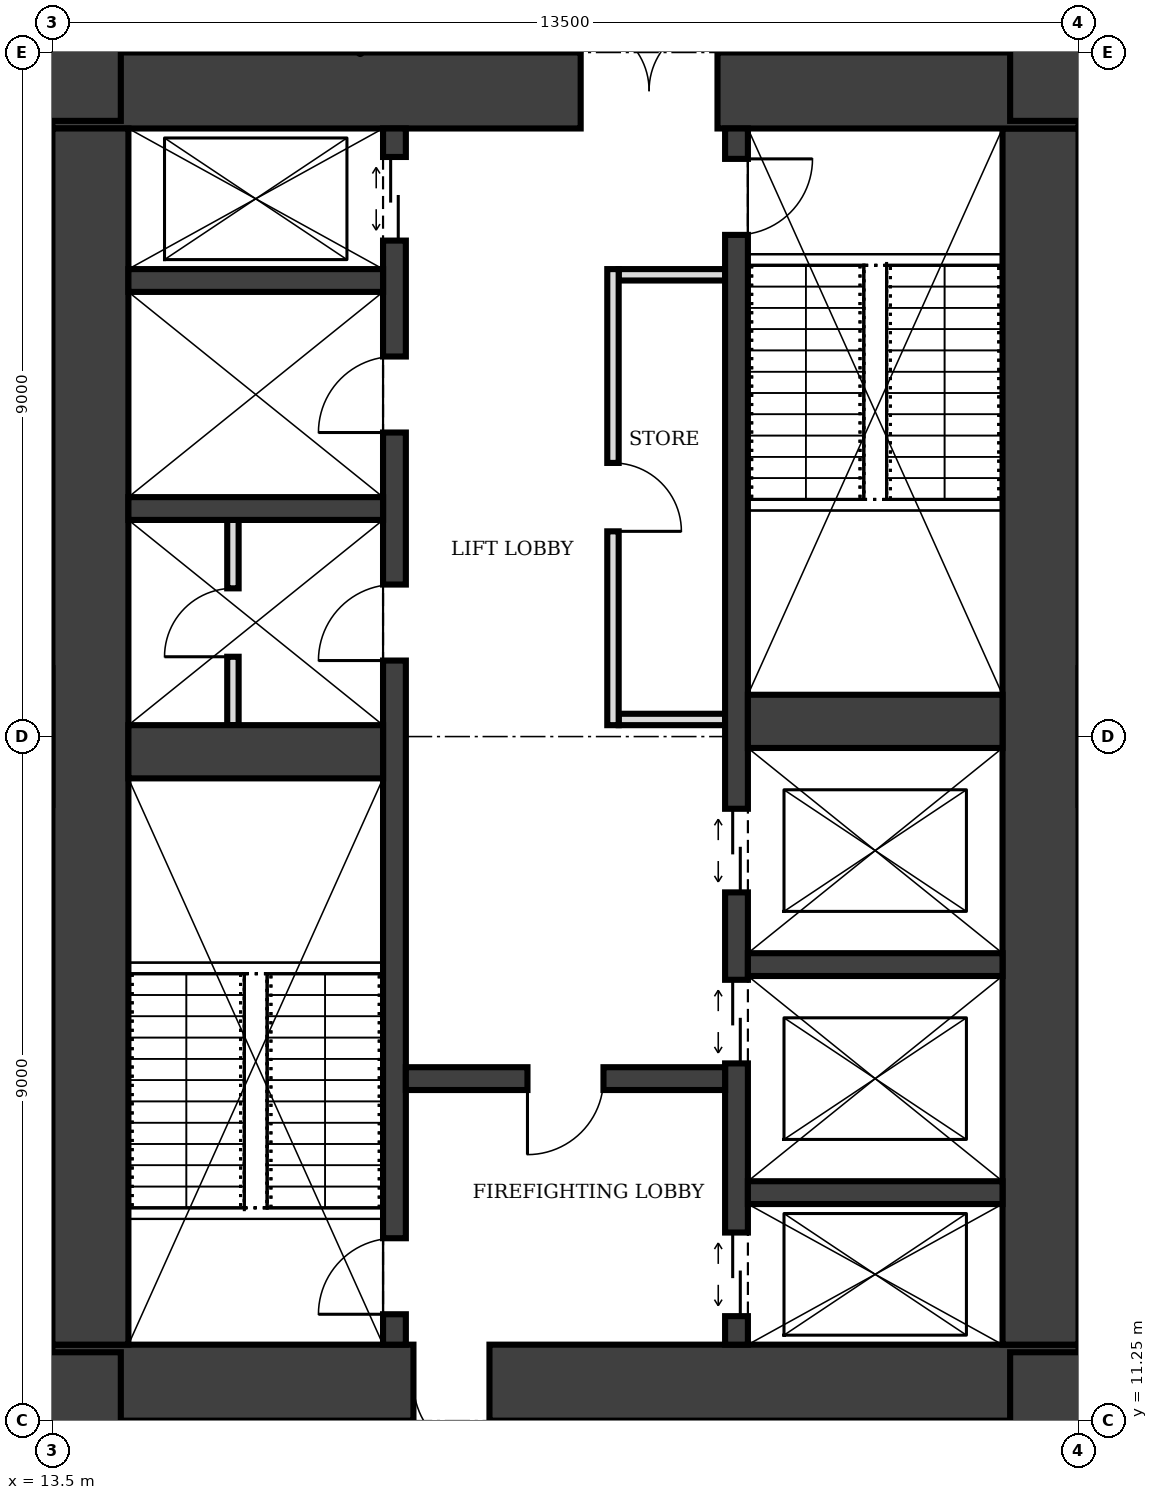
"""IFC4 building model, lengths in metres.
Left out: names, types, materials, properties, quantities, classifications, styles, units other than length and angle.
Written with IfcOpenShell. Run it as: python <this file> out.ifc"""

import sys

from ifc_helpers import new_model, si_unit, direction, frame, frame_2d, origin, place, context, subcontext, project, spatial, rectangle, extrude, element, fill, save


model = new_model("IFC4")
c1 = context("Model", 3, precision=1e-05, world=origin(), true_north=direction((0.0, 1.0)))
c2 = subcontext(c1, "Body", "Model", "MODEL_VIEW")
j1 = project(units=[si_unit("LENGTHUNIT", "METRE"), si_unit("PLANEANGLEUNIT", "RADIAN")], contexts=[c1])
p1 = place(None, origin())
s1 = spatial("IfcSite", under=j1, at=p1, CompositionType="ELEMENT")
p2 = place(p1, origin())
s2 = spatial("IfcBuilding", under=s1, at=p2, CompositionType="ELEMENT")
p3 = place(p2, frame((0.0, 0.0, 245.0)))
s3 = spatial("IfcBuildingStorey", under=s2, at=p3, CompositionType="ELEMENT", Elevation=245.0)
p4 = place(p3, frame((13.5, 11.75, 0.0), z_axis=(0.0, 0.0, 1.0), x_axis=(1.0, 0.0, 0.0)))
e1 = element("IfcWall", 1, at=p4, inside=s3, PredefinedType="SHEAR", context=c2, shape_type="SweptSolid", body=[
    extrude(rectangle(XDim=13.5, YDim=1.0, at=frame_2d((6.75, 0.0))), origin(), (0.0, 0.0, 1.0), 8.0),
])
p5 = place(p4, frame((4.75, 0.0, 0.0)))
e2 = element("IfcOpeningElement", 2, at=p5, cuts=e1, PredefinedType="OPENING", context=c2, shape_type="SweptSolid", body=[
    extrude(rectangle(XDim=1.0, YDim=2.1, at=frame_2d((0.5, 1.05))), frame((0.0, 0.51, 0.0), z_axis=(0.0, -1.0, 0.0), x_axis=(1.0, 0.0, 0.0)), (0.0, 0.0, 1.0), 1.02),
])
p6 = place(p3, frame((26.5, 12.25, 0.0), z_axis=(0.0, 0.0, 1.0), x_axis=(0.0, 1.0, 0.0)))
e3 = element("IfcWall", 3, at=p6, inside=s3, PredefinedType="SHEAR", context=c2, shape_type="SweptSolid", body=[
    extrude(rectangle(XDim=16.0, YDim=1.0, at=frame_2d((8.0, 0.0))), origin(), (0.0, 0.0, 1.0), 8.0),
])
p7 = place(p3, frame((27.0, 28.75, 0.0), z_axis=(0.0, 0.0, 1.0), x_axis=(-1.0, 0.0, 0.0)))
e4 = element("IfcWall", 4, at=p7, inside=s3, PredefinedType="SHEAR", context=c2, shape_type="SweptSolid", body=[
    extrude(rectangle(XDim=13.5, YDim=1.0, at=frame_2d((6.75, 0.0))), origin(), (0.0, 0.0, 1.0), 8.0),
])
p8 = place(p7, frame((4.75, 0.0, 0.0)))
e5 = element("IfcOpeningElement", 5, at=p8, cuts=e4, PredefinedType="OPENING", context=c2, shape_type="SweptSolid", body=[
    extrude(rectangle(XDim=1.8, YDim=2.1, at=frame_2d((0.9, 1.05))), frame((0.0, 0.51, 0.0), z_axis=(0.0, -1.0, 0.0), x_axis=(1.0, 0.0, 0.0)), (0.0, 0.0, 1.0), 1.02),
])
p9 = place(p3, frame((14.0, 28.25, 0.0), z_axis=(0.0, 0.0, 1.0), x_axis=(0.0, -1.0, 0.0)))
e6 = element("IfcWall", 6, at=p9, inside=s3, PredefinedType="SHEAR", context=c2, shape_type="SweptSolid", body=[
    extrude(rectangle(XDim=16.0, YDim=1.0, at=frame_2d((8.0, 0.0))), origin(), (0.0, 0.0, 1.0), 8.0),
])
p10 = place(p3, frame((18.0, 12.25, 0.0), z_axis=(0.0, 0.0, 1.0), x_axis=(0.0, 1.0, 0.0)))
e7 = element("IfcWall", 7, at=p10, inside=s3, PredefinedType="SHEAR", context=c2, shape_type="SweptSolid", body=[
    extrude(rectangle(XDim=16.0, YDim=0.3, at=frame_2d((8.0, 0.0))), origin(), (0.0, 0.0, 1.0), 8.0),
])
p11 = place(p10, frame((0.4, 0.0, 0.0)))
e8 = element("IfcOpeningElement", 8, at=p11, cuts=e7, PredefinedType="OPENING", context=c2, shape_type="SweptSolid", body=[
    extrude(rectangle(XDim=1.0, YDim=2.1, at=frame_2d((0.5, 1.05))), frame((0.0, 0.16, 0.0), z_axis=(0.0, -1.0, 0.0), x_axis=(1.0, 0.0, 0.0)), (0.0, 0.0, 1.0), 0.32),
])
p12 = place(p10, frame((14.525, 0.0, 0.0)))
e9 = element("IfcOpeningElement", 9, at=p12, cuts=e7, PredefinedType="OPENING", context=c2, shape_type="SweptSolid", body=[
    extrude(rectangle(XDim=1.1, YDim=2.1, at=frame_2d((0.55, 1.05))), frame((0.0, 0.16, 0.0), z_axis=(0.0, -1.0, 0.0), x_axis=(1.0, 0.0, 0.0)), (0.0, 0.0, 1.0), 0.32),
])
p13 = place(p10, frame((9.0, 0.0, 0.0)))
e10 = element("IfcOpeningElement", 10, at=p13, cuts=e7, PredefinedType="OPENING", context=c2, shape_type="SweptSolid", body=[
    extrude(rectangle(XDim=1.0, YDim=2.1, at=frame_2d((0.5, 1.05))), frame((0.0, 0.16, 0.0), z_axis=(0.0, -1.0, 0.0), x_axis=(1.0, 0.0, 0.0)), (0.0, 0.0, 1.0), 0.32),
])
p14 = place(p10, frame((12.0, 0.0, 0.0)))
e11 = element("IfcOpeningElement", 11, at=p14, cuts=e7, PredefinedType="OPENING", context=c2, shape_type="SweptSolid", body=[
    extrude(rectangle(XDim=1.0, YDim=2.1, at=frame_2d((0.5, 1.05))), frame((0.0, 0.16, 0.0), z_axis=(0.0, -1.0, 0.0), x_axis=(1.0, 0.0, 0.0)), (0.0, 0.0, 1.0), 0.32),
])
p15 = place(p3, frame((22.5, 12.25, 0.0), z_axis=(0.0, 0.0, 1.0), x_axis=(0.0, 1.0, 0.0)))
e12 = element("IfcWall", 12, at=p15, inside=s3, PredefinedType="SHEAR", context=c2, shape_type="SweptSolid", body=[
    extrude(rectangle(XDim=16.0, YDim=0.3, at=frame_2d((8.0, 0.0))), origin(), (0.0, 0.0, 1.0), 8.0),
])
p16 = place(p15, frame((14.6, 0.0, 0.0)))
e13 = element("IfcOpeningElement", 13, at=p16, cuts=e12, PredefinedType="OPENING", context=c2, shape_type="SweptSolid", body=[
    extrude(rectangle(XDim=1.0, YDim=2.1, at=frame_2d((0.5, 1.05))), frame((0.0, 0.16, 0.0), z_axis=(0.0, -1.0, 0.0), x_axis=(1.0, 0.0, 0.0)), (0.0, 0.0, 1.0), 0.32),
])
p17 = place(p15, frame((0.375, 0.0, 0.0)))
e14 = element("IfcOpeningElement", 14, at=p17, cuts=e12, PredefinedType="OPENING", context=c2, shape_type="SweptSolid", body=[
    extrude(rectangle(XDim=1.1, YDim=2.1, at=frame_2d((0.55, 1.05))), frame((0.0, 0.16, 0.0), z_axis=(0.0, -1.0, 0.0), x_axis=(1.0, 0.0, 0.0)), (0.0, 0.0, 1.0), 0.32),
])
p18 = place(p15, frame((3.7, 0.0, 0.0)))
e15 = element("IfcOpeningElement", 15, at=p18, cuts=e12, PredefinedType="OPENING", context=c2, shape_type="SweptSolid", body=[
    extrude(rectangle(XDim=1.1, YDim=2.1, at=frame_2d((0.55, 1.05))), frame((0.0, 0.16, 0.0), z_axis=(0.0, -1.0, 0.0), x_axis=(1.0, 0.0, 0.0)), (0.0, 0.0, 1.0), 0.32),
])
p19 = place(p15, frame((5.95, 0.0, 0.0)))
e16 = element("IfcOpeningElement", 16, at=p19, cuts=e12, PredefinedType="OPENING", context=c2, shape_type="SweptSolid", body=[
    extrude(rectangle(XDim=1.1, YDim=2.1, at=frame_2d((0.55, 1.05))), frame((0.0, 0.16, 0.0), z_axis=(0.0, -1.0, 0.0), x_axis=(1.0, 0.0, 0.0)), (0.0, 0.0, 1.0), 0.32),
])
p20 = place(p3, frame((14.5, 20.05, 0.0), z_axis=(0.0, 0.0, 1.0), x_axis=(1.0, 0.0, 0.0)))
e17 = element("IfcWall", 17, at=p20, inside=s3, PredefinedType="SHEAR", context=c2, shape_type="SweptSolid", body=[
    extrude(rectangle(XDim=3.35, YDim=0.7, at=frame_2d((1.675, 0.0))), origin(), (0.0, 0.0, 1.0), 8.0),
])
p21 = place(p3, frame((18.15, 15.75, 0.0), z_axis=(0.0, 0.0, 1.0), x_axis=(1.0, 0.0, 0.0)))
e18 = element("IfcWall", 18, at=p21, inside=s3, PredefinedType="SHEAR", context=c2, shape_type="SweptSolid", body=[
    extrude(rectangle(XDim=4.2, YDim=0.3, at=frame_2d((2.1, 0.0))), origin(), (0.0, 0.0, 1.0), 8.0),
])
p22 = place(p21, frame((1.6, 0.0, 0.0)))
e19 = element("IfcOpeningElement", 19, at=p22, cuts=e18, PredefinedType="OPENING", context=c2, shape_type="SweptSolid", body=[
    extrude(rectangle(XDim=1.0, YDim=2.1, at=frame_2d((0.5, 1.05))), frame((0.0, 0.16, 0.0), z_axis=(0.0, -1.0, 0.0), x_axis=(1.0, 0.0, 0.0)), (0.0, 0.0, 1.0), 0.32),
])
for number, where, z_axis, x_axis in (
    (20, (22.65, 14.25, 0.0), (0.0, 0.0, 1.0), (1.0, 0.0, 0.0)),
    (21, (22.65, 17.25, 0.0), (0.0, 0.0, 1.0), (1.0, 0.0, 0.0)),
):
    element("IfcWall", number, at=place(p3, frame(where, z_axis=z_axis, x_axis=x_axis)), inside=s3, PredefinedType="SHEAR", context=c2, shape_type="SweptSolid", body=[
        extrude(rectangle(XDim=3.35, YDim=0.3, at=frame_2d((1.675, 0.0))), origin(), (0.0, 0.0, 1.0), 8.0),
    ])
p23 = place(p3, frame((22.65, 20.45, 0.0), z_axis=(0.0, 0.0, 1.0), x_axis=(1.0, 0.0, 0.0)))
e22 = element("IfcWall", 22, at=p23, inside=s3, PredefinedType="SHEAR", context=c2, shape_type="SweptSolid", body=[
    extrude(rectangle(XDim=3.35, YDim=0.7, at=frame_2d((1.675, 0.0))), origin(), (0.0, 0.0, 1.0), 8.0),
])
for number, where, z_axis, x_axis in (
    (23, (14.5, 23.25, 0.0), (0.0, 0.0, 1.0), (1.0, 0.0, 0.0)),
    (24, (14.5, 26.25, 0.0), (0.0, 0.0, 1.0), (1.0, 0.0, 0.0)),
):
    element("IfcWall", number, at=place(p3, frame(where, z_axis=z_axis, x_axis=x_axis)), inside=s3, PredefinedType="SHEAR", context=c2, shape_type="SweptSolid", body=[
        extrude(rectangle(XDim=3.35, YDim=0.3, at=frame_2d((1.675, 0.0))), origin(), (0.0, 0.0, 1.0), 8.0),
    ])
p24 = place(p3, frame((13.5, 4.5, 0.0), z_axis=(0.0, 0.0, 1.0), x_axis=(0.0, 1.0, 0.0)))
e25 = element("IfcWall", 25, at=p24, inside=s3, PredefinedType="SHEAR", context=c2, shape_type="SweptSolid", body=[
    extrude(rectangle(XDim=7.65, YDim=1.8, at=frame_2d((3.825, 0.0))), origin(), (0.0, 0.0, 1.0), 8.0),
])
p25 = place(p24, frame((2.775, 0.0, 0.0)))
e26 = element("IfcOpeningElement", 26, at=p25, cuts=e25, PredefinedType="OPENING", context=c2, shape_type="SweptSolid", body=[
    extrude(rectangle(XDim=1.2, YDim=2.1, at=frame_2d((0.6, 1.05))), frame((0.0, 0.91, 0.0), z_axis=(0.0, -1.0, 0.0), x_axis=(1.0, 0.0, 0.0)), (0.0, 0.0, 1.0), 1.82),
])
p26 = place(p3, frame((27.0, 4.5, 0.0), z_axis=(0.0, 0.0, 1.0), x_axis=(0.0, 1.0, 0.0)))
e27 = element("IfcWall", 27, at=p26, inside=s3, PredefinedType="SHEAR", context=c2, shape_type="SweptSolid", body=[
    extrude(rectangle(XDim=7.65, YDim=1.8, at=frame_2d((3.825, 0.0))), origin(), (0.0, 0.0, 1.0), 8.0),
])
p27 = place(p26, frame((2.775, 0.0, 0.0)))
e28 = element("IfcOpeningElement", 28, at=p27, cuts=e27, PredefinedType="OPENING", context=c2, shape_type="SweptSolid", body=[
    extrude(rectangle(XDim=1.2, YDim=2.1, at=frame_2d((0.6, 1.05))), frame((0.0, 0.91, 0.0), z_axis=(0.0, -1.0, 0.0), x_axis=(1.0, 0.0, 0.0)), (0.0, 0.0, 1.0), 1.82),
])
p28 = place(p3, frame((13.5, 28.35, 0.0), z_axis=(0.0, 0.0, 1.0), x_axis=(0.0, 1.0, 0.0)))
e29 = element("IfcWall", 29, at=p28, inside=s3, PredefinedType="SHEAR", context=c2, shape_type="SweptSolid", body=[
    extrude(rectangle(XDim=7.65, YDim=1.8, at=frame_2d((3.825, 0.0))), origin(), (0.0, 0.0, 1.0), 8.0),
])
p29 = place(p28, frame((3.675, 0.0, 0.0)))
e30 = element("IfcOpeningElement", 30, at=p29, cuts=e29, PredefinedType="OPENING", context=c2, shape_type="SweptSolid", body=[
    extrude(rectangle(XDim=1.2, YDim=2.1, at=frame_2d((0.6, 1.05))), frame((0.0, 0.91, 0.0), z_axis=(0.0, -1.0, 0.0), x_axis=(1.0, 0.0, 0.0)), (0.0, 0.0, 1.0), 1.82),
])
p30 = place(p3, frame((27.0, 28.35, 0.0), z_axis=(0.0, 0.0, 1.0), x_axis=(0.0, 1.0, 0.0)))
e31 = element("IfcWall", 31, at=p30, inside=s3, PredefinedType="SHEAR", context=c2, shape_type="SweptSolid", body=[
    extrude(rectangle(XDim=7.65, YDim=1.8, at=frame_2d((3.825, 0.0))), origin(), (0.0, 0.0, 1.0), 8.0),
])
p31 = place(p30, frame((3.675, 0.0, 0.0)))
e32 = element("IfcOpeningElement", 32, at=p31, cuts=e31, PredefinedType="OPENING", context=c2, shape_type="SweptSolid", body=[
    extrude(rectangle(XDim=1.2, YDim=2.1, at=frame_2d((0.6, 1.05))), frame((0.0, 0.91, 0.0), z_axis=(0.0, -1.0, 0.0), x_axis=(1.0, 0.0, 0.0)), (0.0, 0.0, 1.0), 1.82),
])
p32 = place(p3, frame((20.875, 20.4, 0.0), z_axis=(0.0, 0.0, 1.0), x_axis=(0.0, 1.0, 0.0)))
e33 = element("IfcWall", 33, at=p32, inside=s3, PredefinedType="PARTITIONING", context=c2, shape_type="SweptSolid", body=[
    extrude(rectangle(XDim=6.0, YDim=0.15, at=frame_2d((3.0, 0.0))), origin(), (0.0, 0.0, 1.0), 7.75),
])
p33 = place(p32, frame((2.55, 0.0, 0.0)))
e34 = element("IfcOpeningElement", 34, at=p33, cuts=e33, PredefinedType="OPENING", context=c2, shape_type="SweptSolid", body=[
    extrude(rectangle(XDim=0.9, YDim=2.1, at=frame_2d((0.45, 1.05))), frame((0.0, 0.085, 0.0), z_axis=(0.0, -1.0, 0.0), x_axis=(1.0, 0.0, 0.0)), (0.0, 0.0, 1.0), 0.17),
])
for number, where, z_axis, x_axis in (
    (35, (20.95, 20.475, 0.0), (0.0, 0.0, 1.0), (1.0, 0.0, 0.0)),
    (36, (20.95, 26.325, 0.0), (0.0, 0.0, 1.0), (1.0, 0.0, 0.0)),
):
    element("IfcWall", number, at=place(p3, frame(where, z_axis=z_axis, x_axis=x_axis)), inside=s3, PredefinedType="PARTITIONING", context=c2, shape_type="SweptSolid", body=[
        extrude(rectangle(XDim=1.4, YDim=0.15, at=frame_2d((0.7, 0.0))), origin(), (0.0, 0.0, 1.0), 7.75),
    ])
p34 = place(p3, frame((15.875, 20.4, 0.0), z_axis=(0.0, 0.0, 1.0), x_axis=(0.0, 1.0, 0.0)))
e37 = element("IfcWall", 37, at=p34, inside=s3, PredefinedType="PARTITIONING", context=c2, shape_type="SweptSolid", body=[
    extrude(rectangle(XDim=2.7, YDim=0.15, at=frame_2d((1.35, 0.0))), origin(), (0.0, 0.0, 1.0), 7.75),
])
p35 = place(p34, frame((0.9, 0.0, 0.0)))
e38 = element("IfcOpeningElement", 38, at=p35, cuts=e37, PredefinedType="OPENING", context=c2, shape_type="SweptSolid", body=[
    extrude(rectangle(XDim=0.9, YDim=2.1, at=frame_2d((0.45, 1.05))), frame((0.0, 0.085, 0.0), z_axis=(0.0, -1.0, 0.0), x_axis=(1.0, 0.0, 0.0)), (0.0, 0.0, 1.0), 0.17),
])
p36 = place(p5, frame((1.0, 0.0, 0.0), z_axis=(0.0, 0.0, 1.0), x_axis=(-1.0, 0.0, 0.0)))
e39 = element("IfcDoor", 39, at=p36, inside=s3, OperationType="SINGLE_SWING_LEFT", PredefinedType="DOOR", context=c2, shape_type="SweptSolid", body=[
    extrude(rectangle(XDim=1.0, YDim=2.1, at=frame_2d((0.5, 1.05))), frame((0.0, 0.025, 0.0), z_axis=(0.0, -1.0, 0.0), x_axis=(1.0, 0.0, 0.0)), (0.0, 0.0, 1.0), 0.05),
])
fill(e2, e39)
p37 = place(p8, frame((1.8, 0.0, 0.0), z_axis=(0.0, 0.0, 1.0), x_axis=(-1.0, 0.0, 0.0)))
e40 = element("IfcDoor", 40, at=p37, inside=s3, OperationType="DOUBLE_DOOR_SINGLE_SWING", PredefinedType="DOOR", context=c2, shape_type="SweptSolid", body=[
    extrude(rectangle(XDim=1.8, YDim=2.1, at=frame_2d((0.9, 1.05))), frame((0.0, 0.025, 0.0), z_axis=(0.0, -1.0, 0.0), x_axis=(1.0, 0.0, 0.0)), (0.0, 0.0, 1.0), 0.05),
])
fill(e5, e40)
p38 = place(p22, frame((1.0, 0.0, 0.0), z_axis=(0.0, 0.0, 1.0), x_axis=(-1.0, 0.0, 0.0)))
e41 = element("IfcDoor", 41, at=p38, inside=s3, OperationType="SINGLE_SWING_RIGHT", PredefinedType="DOOR", context=c2, shape_type="SweptSolid", body=[
    extrude(rectangle(XDim=1.0, YDim=2.1, at=frame_2d((0.5, 1.05))), frame((0.0, 0.025, 0.0), z_axis=(0.0, -1.0, 0.0), x_axis=(1.0, 0.0, 0.0)), (0.0, 0.0, 1.0), 0.05),
])
fill(e19, e41)
p39 = place(p11, origin())
e42 = element("IfcDoor", 42, at=p39, inside=s3, OperationType="SINGLE_SWING_LEFT", PredefinedType="DOOR", context=c2, shape_type="SweptSolid", body=[
    extrude(rectangle(XDim=1.0, YDim=2.1, at=frame_2d((0.5, 1.05))), frame((0.0, 0.025, 0.0), z_axis=(0.0, -1.0, 0.0), x_axis=(1.0, 0.0, 0.0)), (0.0, 0.0, 1.0), 0.05),
])
fill(e8, e42)
p40 = place(p16, frame((1.0, 0.0, 0.0), z_axis=(0.0, 0.0, 1.0), x_axis=(-1.0, 0.0, 0.0)))
e43 = element("IfcDoor", 43, at=p40, inside=s3, OperationType="SINGLE_SWING_LEFT", PredefinedType="DOOR", context=c2, shape_type="SweptSolid", body=[
    extrude(rectangle(XDim=1.0, YDim=2.1, at=frame_2d((0.5, 1.05))), frame((0.0, 0.025, 0.0), z_axis=(0.0, -1.0, 0.0), x_axis=(1.0, 0.0, 0.0)), (0.0, 0.0, 1.0), 0.05),
])
fill(e13, e43)
p41 = place(p17, origin())
e44 = element("IfcDoor", 44, at=p41, inside=s3, OperationType="DOUBLE_DOOR_SLIDING", PredefinedType="DOOR", context=c2, shape_type="SweptSolid", body=[
    extrude(rectangle(XDim=1.1, YDim=2.1, at=frame_2d((0.55, 1.05))), frame((0.0, 0.025, 0.0), z_axis=(0.0, -1.0, 0.0), x_axis=(1.0, 0.0, 0.0)), (0.0, 0.0, 1.0), 0.05),
])
fill(e14, e44)
p42 = place(p12, origin())
e45 = element("IfcDoor", 45, at=p42, inside=s3, OperationType="DOUBLE_DOOR_SLIDING", PredefinedType="DOOR", context=c2, shape_type="SweptSolid", body=[
    extrude(rectangle(XDim=1.1, YDim=2.1, at=frame_2d((0.55, 1.05))), frame((0.0, 0.025, 0.0), z_axis=(0.0, -1.0, 0.0), x_axis=(1.0, 0.0, 0.0)), (0.0, 0.0, 1.0), 0.05),
])
fill(e9, e45)
p43 = place(p18, origin())
e46 = element("IfcDoor", 46, at=p43, inside=s3, OperationType="DOUBLE_DOOR_SLIDING", PredefinedType="DOOR", context=c2, shape_type="SweptSolid", body=[
    extrude(rectangle(XDim=1.1, YDim=2.1, at=frame_2d((0.55, 1.05))), frame((0.0, 0.025, 0.0), z_axis=(0.0, -1.0, 0.0), x_axis=(1.0, 0.0, 0.0)), (0.0, 0.0, 1.0), 0.05),
])
fill(e15, e46)
p44 = place(p19, origin())
e47 = element("IfcDoor", 47, at=p44, inside=s3, OperationType="DOUBLE_DOOR_SLIDING", PredefinedType="DOOR", context=c2, shape_type="SweptSolid", body=[
    extrude(rectangle(XDim=1.1, YDim=2.1, at=frame_2d((0.55, 1.05))), frame((0.0, 0.025, 0.0), z_axis=(0.0, -1.0, 0.0), x_axis=(1.0, 0.0, 0.0)), (0.0, 0.0, 1.0), 0.05),
])
fill(e16, e47)
p45 = place(p33, frame((0.9, 0.0, 0.0), z_axis=(0.0, 0.0, 1.0), x_axis=(-1.0, 0.0, 0.0)))
e48 = element("IfcDoor", 48, at=p45, inside=s3, OperationType="SINGLE_SWING_RIGHT", PredefinedType="DOOR", context=c2, shape_type="SweptSolid", body=[
    extrude(rectangle(XDim=0.9, YDim=2.1, at=frame_2d((0.45, 1.05))), frame((0.0, 0.025, 0.0), z_axis=(0.0, -1.0, 0.0), x_axis=(1.0, 0.0, 0.0)), (0.0, 0.0, 1.0), 0.05),
])
fill(e34, e48)
p46 = place(p13, origin())
e49 = element("IfcDoor", 49, at=p46, inside=s3, OperationType="SINGLE_SWING_LEFT", PredefinedType="DOOR", context=c2, shape_type="SweptSolid", body=[
    extrude(rectangle(XDim=1.0, YDim=2.1, at=frame_2d((0.5, 1.05))), frame((0.0, 0.025, 0.0), z_axis=(0.0, -1.0, 0.0), x_axis=(1.0, 0.0, 0.0)), (0.0, 0.0, 1.0), 0.05),
])
fill(e10, e49)
p47 = place(p35, origin())
e50 = element("IfcDoor", 50, at=p47, inside=s3, OperationType="SINGLE_SWING_LEFT", PredefinedType="DOOR", context=c2, shape_type="SweptSolid", body=[
    extrude(rectangle(XDim=0.9, YDim=2.1, at=frame_2d((0.45, 1.05))), frame((0.0, 0.025, 0.0), z_axis=(0.0, -1.0, 0.0), x_axis=(1.0, 0.0, 0.0)), (0.0, 0.0, 1.0), 0.05),
])
fill(e38, e50)
p48 = place(p14, origin())
e51 = element("IfcDoor", 51, at=p48, inside=s3, OperationType="SINGLE_SWING_LEFT", PredefinedType="DOOR", context=c2, shape_type="SweptSolid", body=[
    extrude(rectangle(XDim=1.0, YDim=2.1, at=frame_2d((0.5, 1.05))), frame((0.0, 0.025, 0.0), z_axis=(0.0, -1.0, 0.0), x_axis=(1.0, 0.0, 0.0)), (0.0, 0.0, 1.0), 0.05),
])
fill(e11, e51)
save(model, sys.argv[1])
